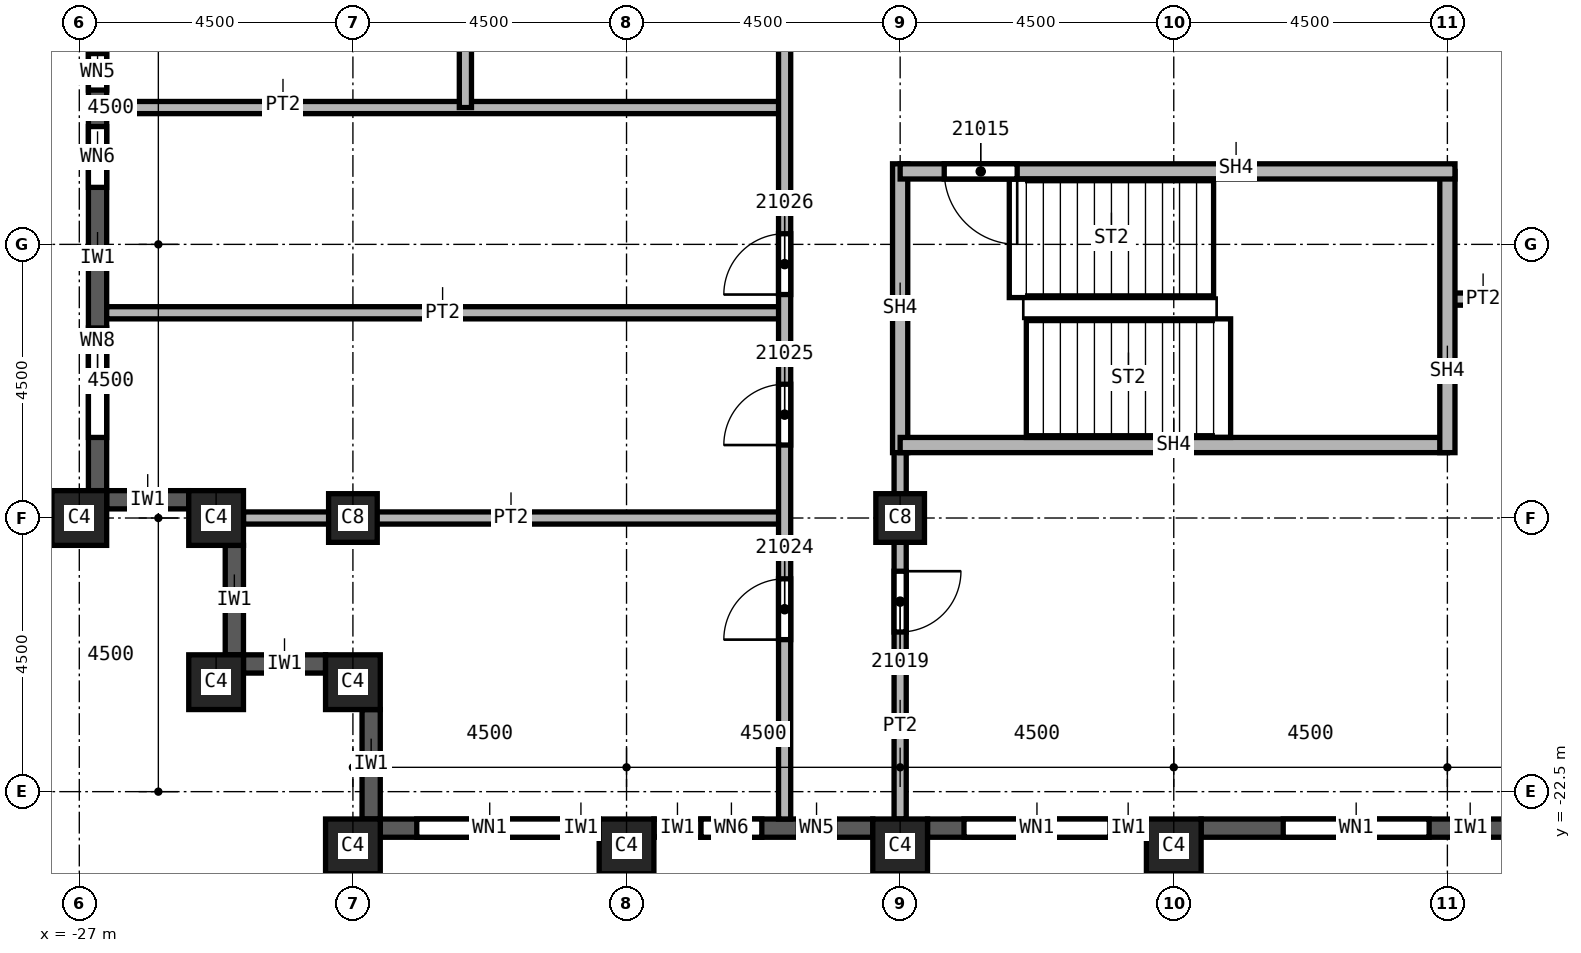
"""IFC4 building model, lengths in metres.
Left out: names, types, materials, properties, quantities, classifications, styles, units other than length and angle.
Written with IfcOpenShell. Run it as: python <this file> out.ifc"""

import sys

from ifc_helpers import new_model, si_unit, direction, frame, frame_2d, origin, origin_2d, place, context, subcontext, project, spatial, rectangle, extrude, element, fill, save


model = new_model("IFC4")
c1 = context("Model", 3, precision=1e-05, world=origin(), true_north=direction((0.0, 1.0)))
c2 = subcontext(c1, "Body", "Model", "MODEL_VIEW")
j1 = project(units=[si_unit("LENGTHUNIT", "METRE"), si_unit("PLANEANGLEUNIT", "RADIAN")], contexts=[c1])
p1 = place(None, origin())
s1 = spatial("IfcSite", under=j1, at=p1, CompositionType="ELEMENT")
p2 = place(p1, origin())
s2 = spatial("IfcBuilding", under=s1, at=p2, CompositionType="ELEMENT")
p3 = place(p2, frame((0.0, 0.0, 308.0)))
s3 = spatial("IfcBuildingStorey", under=s2, at=p3, CompositionType="ELEMENT", Elevation=308.0)
for number, where, z_axis, x_axis in (
    (1, (-13.5, -18.0, 0.0), (0.0, 0.0, 1.0), (1.0, 0.0, 0.0)),
    (2, (-22.5, -18.0, 0.0), (0.0, 0.0, 1.0), (1.0, 0.0, 0.0)),
):
    element("IfcColumn", number, at=place(p3, frame(where, z_axis=z_axis, x_axis=x_axis)), inside=s3, PredefinedType="COLUMN", context=c2, shape_type="SweptSolid", body=[
        extrude(rectangle(XDim=0.8, YDim=0.8, at=origin_2d()), origin(), (0.0, 0.0, 1.0), 3.74),
    ])
for number, where, z_axis, x_axis in (
    (3, (-9.0, -23.4, 0.0), (0.0, 0.0, 1.0), (1.0, 0.0, 0.0)),
    (4, (-13.5, -23.4, 0.0), (0.0, 0.0, 1.0), (1.0, 0.0, 0.0)),
    (5, (-18.0, -23.4, 0.0), (0.0, 0.0, 1.0), (1.0, 0.0, 0.0)),
    (6, (-22.5, -23.4, 0.0), (0.0, 0.0, 1.0), (1.0, 0.0, 0.0)),
    (7, (-27.0, -18.0, 0.0), (0.0, 0.0, 1.0), (0.0, 1.0, 0.0)),
    (8, (-22.5, -20.7, 0.0), (0.0, 0.0, 1.0), (1.0, 0.0, 0.0)),
    (9, (-24.75, -20.7, 0.0), (0.0, 0.0, 1.0), (1.0, 0.0, 0.0)),
    (10, (-24.75, -18.0, 0.0), (0.0, 0.0, 1.0), (1.0, 0.0, 0.0)),
):
    element("IfcColumn", number, at=place(p3, frame(where, z_axis=z_axis, x_axis=x_axis)), inside=s3, PredefinedType="COLUMN", context=c2, shape_type="SweptSolid", body=[
        extrude(rectangle(XDim=0.9, YDim=0.9, at=origin_2d()), origin(), (0.0, 0.0, 1.0), 3.74),
    ])
p4 = place(p3, frame((-26.7, -9.45, 0.0), z_axis=(0.0, 0.0, 1.0), x_axis=(0.0, -1.0, 0.0)))
e11 = element("IfcWall", 11, at=p4, inside=s3, PredefinedType="SOLIDWALL", context=c2, shape_type="SweptSolid", body=[
    extrude(rectangle(XDim=8.1, YDim=0.3, at=frame_2d((4.05, 0.0))), origin(), (0.0, 0.0, 1.0), 3.14),
])
p5 = place(p4, frame((0.913, 0.0, 0.8)))
e12 = element("IfcOpeningElement", 12, at=p5, cuts=e11, PredefinedType="OPENING", context=c2, shape_type="SweptSolid", body=[
    extrude(rectangle(XDim=0.6, YDim=1.95, at=frame_2d((0.3, 0.975))), frame((0.0, 0.15, 0.0), z_axis=(0.0, -1.0, 0.0), x_axis=(1.0, 0.0, 0.0)), (0.0, 0.0, 1.0), 0.3),
])
p6 = place(p4, frame((2.113, 0.0, 0.8)))
e13 = element("IfcOpeningElement", 13, at=p6, cuts=e11, PredefinedType="OPENING", context=c2, shape_type="SweptSolid", body=[
    extrude(rectangle(XDim=1.0, YDim=1.95, at=frame_2d((0.5, 0.975))), frame((0.0, 0.15, 0.0), z_axis=(0.0, -1.0, 0.0), x_axis=(1.0, 0.0, 0.0)), (0.0, 0.0, 1.0), 0.3),
])
p7 = place(p4, frame((5.425, 0.0, 0.8)))
e14 = element("IfcOpeningElement", 14, at=p7, cuts=e11, PredefinedType="OPENING", context=c2, shape_type="SweptSolid", body=[
    extrude(rectangle(XDim=1.8, YDim=1.95, at=frame_2d((0.9, 0.975))), frame((0.0, 0.15, 0.0), z_axis=(0.0, -1.0, 0.0), x_axis=(1.0, 0.0, 0.0)), (0.0, 0.0, 1.0), 0.3),
])
p8 = place(p3, frame((-26.55, -17.7, 0.0), z_axis=(0.0, 0.0, 1.0), x_axis=(1.0, 0.0, 0.0)))
e15 = element("IfcWall", 15, at=p8, inside=s3, PredefinedType="SOLIDWALL", context=c2, shape_type="SweptSolid", body=[
    extrude(rectangle(XDim=1.35, YDim=0.3, at=frame_2d((0.675, 0.0))), origin(), (0.0, 0.0, 1.0), 3.14),
])
p9 = place(p3, frame((-24.45, -18.45, 0.0), z_axis=(0.0, 0.0, 1.0), x_axis=(0.0, -1.0, 0.0)))
e16 = element("IfcWall", 16, at=p9, inside=s3, PredefinedType="SOLIDWALL", context=c2, shape_type="SweptSolid", body=[
    extrude(rectangle(XDim=1.8, YDim=0.3, at=frame_2d((0.9, 0.0))), origin(), (0.0, 0.0, 1.0), 3.14),
])
p10 = place(p3, frame((-24.3, -20.4, 0.0), z_axis=(0.0, 0.0, 1.0), x_axis=(1.0, 0.0, 0.0)))
e17 = element("IfcWall", 17, at=p10, inside=s3, PredefinedType="SOLIDWALL", context=c2, shape_type="SweptSolid", body=[
    extrude(rectangle(XDim=1.35, YDim=0.3, at=frame_2d((0.675, 0.0))), origin(), (0.0, 0.0, 1.0), 3.14),
])
p11 = place(p3, frame((-22.2, -21.15, 0.0), z_axis=(0.0, 0.0, 1.0), x_axis=(0.0, -1.0, 0.0)))
e18 = element("IfcWall", 18, at=p11, inside=s3, PredefinedType="SOLIDWALL", context=c2, shape_type="SweptSolid", body=[
    extrude(rectangle(XDim=1.8, YDim=0.3, at=frame_2d((0.9, 0.0))), origin(), (0.0, 0.0, 1.0), 3.14),
])
p12 = place(p3, frame((-22.05, -23.1, 0.0), z_axis=(0.0, 0.0, 1.0), x_axis=(1.0, 0.0, 0.0)))
e19 = element("IfcWall", 19, at=p12, inside=s3, PredefinedType="SOLIDWALL", context=c2, shape_type="SweptSolid", body=[
    extrude(rectangle(XDim=3.6, YDim=0.3, at=frame_2d((1.8, 0.0))), origin(), (0.0, 0.0, 1.0), 3.14),
])
p13 = place(p12, frame((0.6, 0.0, 0.8)))
e20 = element("IfcOpeningElement", 20, at=p13, cuts=e19, PredefinedType="OPENING", context=c2, shape_type="SweptSolid", body=[
    extrude(rectangle(XDim=2.4, YDim=1.95, at=frame_2d((1.2, 0.975))), frame((0.0, 0.15, 0.0), z_axis=(0.0, -1.0, 0.0), x_axis=(1.0, 0.0, 0.0)), (0.0, 0.0, 1.0), 0.3),
])
p14 = place(p3, frame((-17.55, -23.1, 0.0), z_axis=(0.0, 0.0, 1.0), x_axis=(1.0, 0.0, 0.0)))
e21 = element("IfcWall", 21, at=p14, inside=s3, PredefinedType="SOLIDWALL", context=c2, shape_type="SweptSolid", body=[
    extrude(rectangle(XDim=3.6, YDim=0.3, at=frame_2d((1.8, 0.0))), origin(), (0.0, 0.0, 1.0), 3.14),
])
p15 = place(p14, frame((0.775, 0.0, 0.8)))
e22 = element("IfcOpeningElement", 22, at=p15, cuts=e21, PredefinedType="OPENING", context=c2, shape_type="SweptSolid", body=[
    extrude(rectangle(XDim=1.0, YDim=1.95, at=frame_2d((0.5, 0.975))), frame((0.0, 0.15, 0.0), z_axis=(0.0, -1.0, 0.0), x_axis=(1.0, 0.0, 0.0)), (0.0, 0.0, 1.0), 0.3),
])
p16 = place(p14, frame((2.375, 0.0, 0.8)))
e23 = element("IfcOpeningElement", 23, at=p16, cuts=e21, PredefinedType="OPENING", context=c2, shape_type="SweptSolid", body=[
    extrude(rectangle(XDim=0.6, YDim=1.95, at=frame_2d((0.3, 0.975))), frame((0.0, 0.15, 0.0), z_axis=(0.0, -1.0, 0.0), x_axis=(1.0, 0.0, 0.0)), (0.0, 0.0, 1.0), 0.3),
])
p17 = place(p3, frame((-13.05, -23.1, 0.0), z_axis=(0.0, 0.0, 1.0), x_axis=(1.0, 0.0, 0.0)))
e24 = element("IfcWall", 24, at=p17, inside=s3, PredefinedType="SOLIDWALL", context=c2, shape_type="SweptSolid", body=[
    extrude(rectangle(XDim=3.6, YDim=0.3, at=frame_2d((1.8, 0.0))), origin(), (0.0, 0.0, 1.0), 3.14),
])
p18 = place(p17, frame((0.6, 0.0, 0.8)))
e25 = element("IfcOpeningElement", 25, at=p18, cuts=e24, PredefinedType="OPENING", context=c2, shape_type="SweptSolid", body=[
    extrude(rectangle(XDim=2.4, YDim=1.95, at=frame_2d((1.2, 0.975))), frame((0.0, 0.15, 0.0), z_axis=(0.0, -1.0, 0.0), x_axis=(1.0, 0.0, 0.0)), (0.0, 0.0, 1.0), 0.3),
])
p19 = place(p3, frame((-8.55, -23.1, 0.0), z_axis=(0.0, 0.0, 1.0), x_axis=(1.0, 0.0, 0.0)))
e26 = element("IfcWall", 26, at=p19, inside=s3, PredefinedType="SOLIDWALL", context=c2, shape_type="SweptSolid", body=[
    extrude(rectangle(XDim=5.1, YDim=0.3, at=frame_2d((2.55, 0.0))), origin(), (0.0, 0.0, 1.0), 3.14),
])
p20 = place(p19, frame((1.35, 0.0, 0.8)))
e27 = element("IfcOpeningElement", 27, at=p20, cuts=e26, PredefinedType="OPENING", context=c2, shape_type="SweptSolid", body=[
    extrude(rectangle(XDim=2.4, YDim=1.95, at=frame_2d((1.2, 0.975))), frame((0.0, 0.15, 0.0), z_axis=(0.0, -1.0, 0.0), x_axis=(1.0, 0.0, 0.0)), (0.0, 0.0, 1.0), 0.3),
])
for number, where, z_axis, x_axis in (
    (28, (-26.55, -14.625, 0.0), (0.0, 0.0, 1.0), (1.0, 0.0, 0.0)),
    (29, (-26.55, -11.25, 0.0), (0.0, 0.0, 1.0), (1.0, 0.0, 0.0)),
):
    element("IfcWall", number, at=place(p3, frame(where, z_axis=z_axis, x_axis=x_axis)), inside=s3, PredefinedType="PARTITIONING", context=c2, shape_type="SweptSolid", body=[
        extrude(rectangle(XDim=11.15, YDim=0.2, at=frame_2d((5.575, 0.0))), origin(), (0.0, 0.0, 1.0), 3.74),
    ])
p21 = place(p3, frame((-24.3, -18.0, 0.0), z_axis=(0.0, 0.0, 1.0), x_axis=(1.0, 0.0, 0.0)))
e30 = element("IfcWall", 30, at=p21, inside=s3, PredefinedType="PARTITIONING", context=c2, shape_type="SweptSolid", body=[
    extrude(rectangle(XDim=8.9, YDim=0.2, at=frame_2d((4.45, 0.0))), origin(), (0.0, 0.0, 1.0), 3.74),
])
p22 = place(p3, frame((-20.65, -11.25, 0.0), z_axis=(0.0, 0.0, 1.0), x_axis=(0.0, 1.0, 0.0)))
e31 = element("IfcWall", 31, at=p22, inside=s3, PredefinedType="PARTITIONING", context=c2, shape_type="SweptSolid", body=[
    extrude(rectangle(XDim=18.1, YDim=0.2, at=frame_2d((9.05, 0.0))), origin(), (0.0, 0.0, 1.0), 3.74),
])
p23 = place(p22, frame((16.8, 0.0, 0.0)))
e32 = element("IfcOpeningElement", 32, at=p23, cuts=e31, PredefinedType="OPENING", context=c2, shape_type="SweptSolid", body=[
    extrude(rectangle(XDim=1.0, YDim=2.1, at=frame_2d((0.5, 1.05))), frame((0.0, 0.1, 0.0), z_axis=(0.0, -1.0, 0.0), x_axis=(1.0, 0.0, 0.0)), (0.0, 0.0, 1.0), 0.2),
])
p24 = place(p22, frame((3.1, 0.0, 0.0)))
e33 = element("IfcOpeningElement", 33, at=p24, cuts=e31, PredefinedType="OPENING", context=c2, shape_type="SweptSolid", body=[
    extrude(rectangle(XDim=1.0, YDim=2.1, at=frame_2d((0.5, 1.05))), frame((0.0, 0.1, 0.0), z_axis=(0.0, -1.0, 0.0), x_axis=(1.0, 0.0, 0.0)), (0.0, 0.0, 1.0), 0.2),
])
p25 = place(p3, frame((-15.4, -22.95, 0.0), z_axis=(0.0, 0.0, 1.0), x_axis=(0.0, 1.0, 0.0)))
e34 = element("IfcWall", 34, at=p25, inside=s3, PredefinedType="PARTITIONING", context=c2, shape_type="SweptSolid", body=[
    extrude(rectangle(XDim=36.55, YDim=0.2, at=frame_2d((18.275, 0.0))), origin(), (0.0, 0.0, 1.0), 3.74),
])
p26 = place(p25, frame((23.1, 0.0, 0.0)))
e35 = element("IfcOpeningElement", 35, at=p26, cuts=e34, PredefinedType="OPENING", context=c2, shape_type="SweptSolid", body=[
    extrude(rectangle(XDim=1.0, YDim=2.1, at=frame_2d((0.5, 1.05))), frame((0.0, 0.1, 0.0), z_axis=(0.0, -1.0, 0.0), x_axis=(1.0, 0.0, 0.0)), (0.0, 0.0, 1.0), 0.2),
])
p27 = place(p25, frame((34.35, 0.0, 0.0)))
e36 = element("IfcOpeningElement", 36, at=p27, cuts=e34, PredefinedType="OPENING", context=c2, shape_type="SweptSolid", body=[
    extrude(rectangle(XDim=1.0, YDim=2.1, at=frame_2d((0.5, 1.05))), frame((0.0, 0.1, 0.0), z_axis=(0.0, -1.0, 0.0), x_axis=(1.0, 0.0, 0.0)), (0.0, 0.0, 1.0), 0.2),
])
p28 = place(p25, frame((2.95, 0.0, 0.0)))
e37 = element("IfcOpeningElement", 37, at=p28, cuts=e34, PredefinedType="OPENING", context=c2, shape_type="SweptSolid", body=[
    extrude(rectangle(XDim=1.0, YDim=2.1, at=frame_2d((0.5, 1.05))), frame((0.0, 0.1, 0.0), z_axis=(0.0, -1.0, 0.0), x_axis=(1.0, 0.0, 0.0)), (0.0, 0.0, 1.0), 0.2),
])
p29 = place(p25, frame((6.15, 0.0, 0.0)))
e38 = element("IfcOpeningElement", 38, at=p29, cuts=e34, PredefinedType="OPENING", context=c2, shape_type="SweptSolid", body=[
    extrude(rectangle(XDim=1.0, YDim=2.1, at=frame_2d((0.5, 1.05))), frame((0.0, 0.1, 0.0), z_axis=(0.0, -1.0, 0.0), x_axis=(1.0, 0.0, 0.0)), (0.0, 0.0, 1.0), 0.2),
])
p30 = place(p25, frame((8.625, 0.0, 0.0)))
e39 = element("IfcOpeningElement", 39, at=p30, cuts=e34, PredefinedType="OPENING", context=c2, shape_type="SweptSolid", body=[
    extrude(rectangle(XDim=1.0, YDim=2.1, at=frame_2d((0.5, 1.05))), frame((0.0, 0.1, 0.0), z_axis=(0.0, -1.0, 0.0), x_axis=(1.0, 0.0, 0.0)), (0.0, 0.0, 1.0), 0.2),
])
p31 = place(p25, frame((15.0, 0.0, 0.0)))
e40 = element("IfcOpeningElement", 40, at=p31, cuts=e34, PredefinedType="OPENING", context=c2, shape_type="SweptSolid", body=[
    extrude(rectangle(XDim=1.0, YDim=2.1, at=frame_2d((0.5, 1.05))), frame((0.0, 0.1, 0.0), z_axis=(0.0, -1.0, 0.0), x_axis=(1.0, 0.0, 0.0)), (0.0, 0.0, 1.0), 0.2),
])
p32 = place(p3, frame((-13.5, -16.675, 0.0), z_axis=(0.0, 0.0, 1.0), x_axis=(0.0, -1.0, 0.0)))
e41 = element("IfcWall", 41, at=p32, inside=s3, PredefinedType="PARTITIONING", context=c2, shape_type="SweptSolid", body=[
    extrude(rectangle(XDim=6.275, YDim=0.2, at=frame_2d((3.137, 0.0))), origin(), (0.0, 0.0, 1.0), 3.74),
])
p33 = place(p32, frame((2.2, 0.0, 0.0)))
e42 = element("IfcOpeningElement", 42, at=p33, cuts=e41, PredefinedType="OPENING", context=c2, shape_type="SweptSolid", body=[
    extrude(rectangle(XDim=1.0, YDim=2.1, at=frame_2d((0.5, 1.05))), frame((0.0, 0.1, 0.0), z_axis=(0.0, -1.0, 0.0), x_axis=(1.0, 0.0, 0.0)), (0.0, 0.0, 1.0), 0.2),
])
p34 = place(p3, frame((-3.45, -14.4, 0.0), z_axis=(0.0, 0.0, 1.0), x_axis=(-1.0, 0.0, 0.0)))
e43 = element("IfcWall", 43, at=p34, inside=s3, PredefinedType="PARTITIONING", context=c2, shape_type="SweptSolid", body=[
    extrude(rectangle(XDim=1.05, YDim=0.2, at=frame_2d((0.525, 0.0))), origin(), (0.0, 0.0, 1.0), 3.74),
])
p35 = place(p3, frame((-13.5, -12.175, 0.0), z_axis=(0.0, 0.0, 1.0), x_axis=(0.0, -1.0, 0.0)))
e44 = element("IfcWall", 44, at=p35, inside=s3, PredefinedType="SOLIDWALL", context=c2, shape_type="SweptSolid", body=[
    extrude(rectangle(XDim=4.75, YDim=0.25, at=frame_2d((2.375, 0.0))), origin(), (0.0, 0.0, 1.0), 3.74),
])
p36 = place(p3, frame((-4.5, -16.8, 0.0), z_axis=(0.0, 0.0, 1.0), x_axis=(-1.0, 0.0, 0.0)))
e45 = element("IfcWall", 45, at=p36, inside=s3, PredefinedType="SOLIDWALL", context=c2, shape_type="SweptSolid", body=[
    extrude(rectangle(XDim=9.0, YDim=0.25, at=frame_2d((4.5, 0.0))), origin(), (0.0, 0.0, 1.0), 3.74),
])
p37 = place(p3, frame((-4.5, -12.3, 0.0), z_axis=(0.0, 0.0, 1.0), x_axis=(0.0, -1.0, 0.0)))
e46 = element("IfcWall", 46, at=p37, inside=s3, PredefinedType="SOLIDWALL", context=c2, shape_type="SweptSolid", body=[
    extrude(rectangle(XDim=4.625, YDim=0.25, at=frame_2d((2.312, 0.0))), origin(), (0.0, 0.0, 1.0), 3.74),
])
p38 = place(p3, frame((-4.375, -12.3, 0.0), z_axis=(0.0, 0.0, 1.0), x_axis=(-1.0, 0.0, 0.0)))
e47 = element("IfcWall", 47, at=p38, inside=s3, PredefinedType="SOLIDWALL", context=c2, shape_type="SweptSolid", body=[
    extrude(rectangle(XDim=9.125, YDim=0.25, at=frame_2d((4.562, 0.0))), origin(), (0.0, 0.0, 1.0), 3.74),
])
p39 = place(p38, frame((7.2, 0.0, 0.0)))
e48 = element("IfcOpeningElement", 48, at=p39, cuts=e47, PredefinedType="OPENING", context=c2, shape_type="SweptSolid", body=[
    extrude(rectangle(XDim=1.2, YDim=2.1, at=frame_2d((0.6, 1.05))), frame((0.0, 0.125, 0.0), z_axis=(0.0, -1.0, 0.0), x_axis=(1.0, 0.0, 0.0)), (0.0, 0.0, 1.0), 0.25),
])
p40 = place(p13, origin())
e49 = element("IfcWindow", 49, at=p40, inside=s3, PartitioningType="SINGLE_PANEL", PredefinedType="WINDOW", context=c2, shape_type="SweptSolid", body=[
    extrude(rectangle(XDim=2.4, YDim=1.95, at=frame_2d((1.2, 0.975))), frame((0.0, 0.03, 0.0), z_axis=(0.0, -1.0, 0.0), x_axis=(1.0, 0.0, 0.0)), (0.0, 0.0, 1.0), 0.06),
])
fill(e20, e49)
p41 = place(p18, origin())
e50 = element("IfcWindow", 50, at=p41, inside=s3, PartitioningType="SINGLE_PANEL", PredefinedType="WINDOW", context=c2, shape_type="SweptSolid", body=[
    extrude(rectangle(XDim=2.4, YDim=1.95, at=frame_2d((1.2, 0.975))), frame((0.0, 0.03, 0.0), z_axis=(0.0, -1.0, 0.0), x_axis=(1.0, 0.0, 0.0)), (0.0, 0.0, 1.0), 0.06),
])
fill(e25, e50)
p42 = place(p20, origin())
e51 = element("IfcWindow", 51, at=p42, inside=s3, PartitioningType="SINGLE_PANEL", PredefinedType="WINDOW", context=c2, shape_type="SweptSolid", body=[
    extrude(rectangle(XDim=2.4, YDim=1.95, at=frame_2d((1.2, 0.975))), frame((0.0, 0.03, 0.0), z_axis=(0.0, -1.0, 0.0), x_axis=(1.0, 0.0, 0.0)), (0.0, 0.0, 1.0), 0.06),
])
fill(e27, e51)
p43 = place(p39, origin())
e52 = element("IfcDoor", 52, at=p43, inside=s3, OperationType="SINGLE_SWING_RIGHT", PredefinedType="DOOR", context=c2, shape_type="SweptSolid", body=[
    extrude(rectangle(XDim=1.2, YDim=2.1, at=frame_2d((0.6, 1.05))), frame((0.0, 0.025, 0.0), z_axis=(0.0, -1.0, 0.0), x_axis=(1.0, 0.0, 0.0)), (0.0, 0.0, 1.0), 0.05),
])
fill(e48, e52)
p44 = place(p33, origin())
e53 = element("IfcDoor", 53, at=p44, inside=s3, OperationType="SINGLE_SWING_RIGHT", PredefinedType="DOOR", context=c2, shape_type="SweptSolid", body=[
    extrude(rectangle(XDim=1.0, YDim=2.1, at=frame_2d((0.5, 1.05))), frame((0.0, 0.025, 0.0), z_axis=(0.0, -1.0, 0.0), x_axis=(1.0, 0.0, 0.0)), (0.0, 0.0, 1.0), 0.05),
])
fill(e42, e53)
p45 = place(p28, origin())
e54 = element("IfcDoor", 54, at=p45, inside=s3, OperationType="SINGLE_SWING_LEFT", PredefinedType="DOOR", context=c2, shape_type="SweptSolid", body=[
    extrude(rectangle(XDim=1.0, YDim=2.1, at=frame_2d((0.5, 1.05))), frame((0.0, 0.025, 0.0), z_axis=(0.0, -1.0, 0.0), x_axis=(1.0, 0.0, 0.0)), (0.0, 0.0, 1.0), 0.05),
])
fill(e37, e54)
p46 = place(p29, origin())
e55 = element("IfcDoor", 55, at=p46, inside=s3, OperationType="SINGLE_SWING_RIGHT", PredefinedType="DOOR", context=c2, shape_type="SweptSolid", body=[
    extrude(rectangle(XDim=1.0, YDim=2.1, at=frame_2d((0.5, 1.05))), frame((0.0, 0.025, 0.0), z_axis=(0.0, -1.0, 0.0), x_axis=(1.0, 0.0, 0.0)), (0.0, 0.0, 1.0), 0.05),
])
fill(e38, e55)
p47 = place(p30, origin())
e56 = element("IfcDoor", 56, at=p47, inside=s3, OperationType="SINGLE_SWING_LEFT", PredefinedType="DOOR", context=c2, shape_type="SweptSolid", body=[
    extrude(rectangle(XDim=1.0, YDim=2.1, at=frame_2d((0.5, 1.05))), frame((0.0, 0.025, 0.0), z_axis=(0.0, -1.0, 0.0), x_axis=(1.0, 0.0, 0.0)), (0.0, 0.0, 1.0), 0.05),
])
fill(e39, e56)
p48 = place(p5, origin())
e57 = element("IfcWindow", 57, at=p48, inside=s3, PartitioningType="SINGLE_PANEL", PredefinedType="WINDOW", context=c2, shape_type="SweptSolid", body=[
    extrude(rectangle(XDim=0.6, YDim=1.95, at=frame_2d((0.3, 0.975))), frame((0.0, 0.03, 0.0), z_axis=(0.0, -1.0, 0.0), x_axis=(1.0, 0.0, 0.0)), (0.0, 0.0, 1.0), 0.06),
])
fill(e12, e57)
p49 = place(p6, origin())
e58 = element("IfcWindow", 58, at=p49, inside=s3, PartitioningType="SINGLE_PANEL", PredefinedType="WINDOW", context=c2, shape_type="SweptSolid", body=[
    extrude(rectangle(XDim=1.0, YDim=1.95, at=frame_2d((0.5, 0.975))), frame((0.0, 0.03, 0.0), z_axis=(0.0, -1.0, 0.0), x_axis=(1.0, 0.0, 0.0)), (0.0, 0.0, 1.0), 0.06),
])
fill(e13, e58)
p50 = place(p7, origin())
e59 = element("IfcWindow", 59, at=p50, inside=s3, PartitioningType="SINGLE_PANEL", PredefinedType="WINDOW", context=c2, shape_type="SweptSolid", body=[
    extrude(rectangle(XDim=1.8, YDim=1.95, at=frame_2d((0.9, 0.975))), frame((0.0, 0.03, 0.0), z_axis=(0.0, -1.0, 0.0), x_axis=(1.0, 0.0, 0.0)), (0.0, 0.0, 1.0), 0.06),
])
fill(e14, e59)
p51 = place(p15, origin())
e60 = element("IfcWindow", 60, at=p51, inside=s3, PartitioningType="SINGLE_PANEL", PredefinedType="WINDOW", context=c2, shape_type="SweptSolid", body=[
    extrude(rectangle(XDim=1.0, YDim=1.95, at=frame_2d((0.5, 0.975))), frame((0.0, 0.03, 0.0), z_axis=(0.0, -1.0, 0.0), x_axis=(1.0, 0.0, 0.0)), (0.0, 0.0, 1.0), 0.06),
])
fill(e22, e60)
p52 = place(p16, origin())
e61 = element("IfcWindow", 61, at=p52, inside=s3, PartitioningType="SINGLE_PANEL", PredefinedType="WINDOW", context=c2, shape_type="SweptSolid", body=[
    extrude(rectangle(XDim=0.6, YDim=1.95, at=frame_2d((0.3, 0.975))), frame((0.0, 0.03, 0.0), z_axis=(0.0, -1.0, 0.0), x_axis=(1.0, 0.0, 0.0)), (0.0, 0.0, 1.0), 0.06),
])
fill(e23, e61)
save(model, sys.argv[1])
